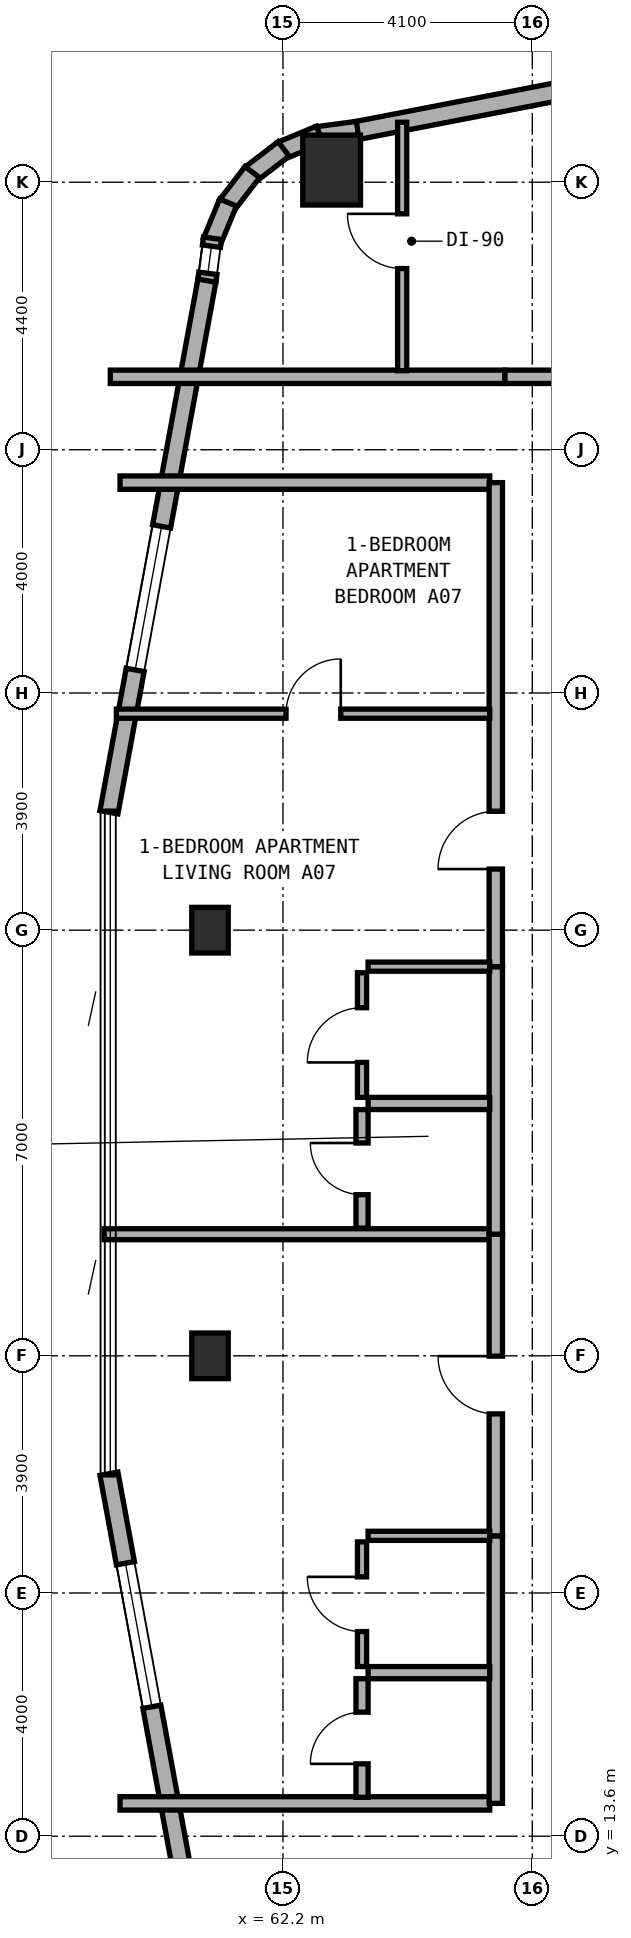
"""IFC4 building model, lengths in metres.
Left out: names, types, materials, properties, quantities, classifications, styles, units other than length and angle.
Written with IfcOpenShell. Run it as: python <this file> out.ifc"""

import sys

from ifc_helpers import new_model, si_unit, direction, frame, frame_2d, origin, origin_2d, place, context, subcontext, project, spatial, rectangle, extrude, element, fill, save


model = new_model("IFC4")
c1 = context("Model", 3, precision=1e-05, world=origin(), true_north=direction((0.0, 1.0)))
c2 = subcontext(c1, "Body", "Model", "MODEL_VIEW")
j1 = project(units=[si_unit("LENGTHUNIT", "METRE"), si_unit("PLANEANGLEUNIT", "RADIAN")], contexts=[c1])
p1 = place(None, origin())
s1 = spatial("IfcSite", under=j1, at=p1, CompositionType="ELEMENT")
p2 = place(p1, origin())
s2 = spatial("IfcBuilding", under=s1, at=p2, CompositionType="ELEMENT")
p3 = place(p2, frame((0.0, 0.0, 80.0)))
s3 = spatial("IfcBuildingStorey", under=s2, at=p3, CompositionType="ELEMENT", Elevation=80.0)
for number, where, z_axis, x_axis in (
    (1, (61.0, 21.5, 0.0), (0.0, 0.0, 1.0), (1.0, 0.0, 0.0)),
    (2, (61.0, 28.5, 0.0), (0.0, 0.0, 1.0), (1.0, 0.0, 0.0)),
):
    element("IfcColumn", number, at=place(p3, frame(where, z_axis=z_axis, x_axis=x_axis)), inside=s3, PredefinedType="COLUMN", context=c2, shape_type="SweptSolid", body=[
        extrude(rectangle(XDim=0.6, YDim=0.75, at=origin_2d()), origin(), (0.0, 0.0, 1.0), 3.5),
    ])
p4 = place(p3, frame((63.0, 41.0, 0.0), z_axis=(0.0, 0.0, 1.0), x_axis=(1.0, 0.0, 0.0)))
e3 = element("IfcColumn", 3, at=p4, inside=s3, PredefinedType="COLUMN", context=c2, shape_type="SweptSolid", body=[
    extrude(rectangle(XDim=0.95, YDim=1.15, at=origin_2d()), origin(), (0.0, 0.0, 1.0), 3.5),
])
p5 = place(p3, frame((71.743, 43.263, 0.0), z_axis=(0.0, 0.0, 1.0), x_axis=(-0.981750199588, -0.190175039396, 0.0)))
e4 = element("IfcWall", 4, at=p5, inside=s3, PredefinedType="STANDARD", context=c2, shape_type="SweptSolid", body=[
    extrude(rectangle(XDim=8.477, YDim=0.3, at=frame_2d((4.238, 0.0))), origin(), (0.0, 0.0, 1.0), 3.25),
])
p6 = place(p5, frame((2.623, 0.0, 0.8)))
e5 = element("IfcOpeningElement", 5, at=p6, cuts=e4, PredefinedType="OPENING", context=c2, shape_type="SweptSolid", body=[
    extrude(rectangle(XDim=2.4, YDim=1.6, at=frame_2d((1.2, 0.8))), frame((0.0, 0.16, 0.0), z_axis=(0.0, -1.0, 0.0), x_axis=(1.0, 0.0, 0.0)), (0.0, 0.0, 1.0), 0.32),
])
p7 = place(p3, frame((63.428, 41.652, 0.0), z_axis=(0.0, 0.0, 1.0), x_axis=(-0.991293937098, -0.131667498923, 0.0)))
e6 = element("IfcWall", 6, at=p7, inside=s3, PredefinedType="STANDARD", context=c2, shape_type="SweptSolid", body=[
    extrude(rectangle(XDim=0.677, YDim=0.3, at=frame_2d((0.338, 0.0))), origin(), (0.0, 0.0, 1.0), 3.25),
])
p8 = place(p3, frame((62.807, 41.582, 0.0), z_axis=(0.0, 0.0, 1.0), x_axis=(-0.924042561464, -0.382289608286, 0.0)))
e7 = element("IfcWall", 7, at=p8, inside=s3, PredefinedType="STANDARD", context=c2, shape_type="SweptSolid", body=[
    extrude(rectangle(XDim=0.694, YDim=0.3, at=frame_2d((0.347, 0.0))), origin(), (0.0, 0.0, 1.0), 3.25),
])
for number, where, z_axis, x_axis in (
    (8, (62.211, 41.348, 0.0), (0.0, 0.0, 1.0), (-0.793, -0.609, 0.0)),
    (9, (61.696, 40.967, 0.0), (0.0, 0.0, 1.0), (-0.61, -0.793, 0.0)),
    (10, (61.297, 40.466, 0.0), (0.0, 0.0, 1.0), (-0.382, -0.924, 0.0)),
):
    element("IfcWall", number, at=place(p3, frame(where, z_axis=z_axis, x_axis=x_axis)), inside=s3, PredefinedType="STANDARD", context=c2, shape_type="SweptSolid", body=[
        extrude(rectangle(XDim=0.694, YDim=0.3, at=frame_2d((0.347, 0.0))), origin(), (0.0, 0.0, 1.0), 3.25),
    ])
p9 = place(p3, frame((61.041, 39.878, 0.0), z_axis=(0.0, 0.0, 1.0), x_axis=(-0.130658543777, -0.991427427974, 0.0)))
e11 = element("IfcWall", 11, at=p9, inside=s3, PredefinedType="STANDARD", context=c2, shape_type="SweptSolid", body=[
    extrude(rectangle(XDim=0.712, YDim=0.3, at=frame_2d((0.356, 0.0))), origin(), (0.0, 0.0, 1.0), 3.25),
])
p10 = place(p9, frame((0.131, 0.0, 0.85)))
e12 = element("IfcOpeningElement", 12, at=p10, cuts=e11, PredefinedType="OPENING", context=c2, shape_type="SweptSolid", body=[
    extrude(rectangle(XDim=0.45, YDim=1.5, at=frame_2d((0.225, 0.75))), frame((0.0, 0.16, 0.0), z_axis=(0.0, -1.0, 0.0), x_axis=(1.0, 0.0, 0.0)), (0.0, 0.0, 1.0), 0.32),
])
p11 = place(p3, frame((60.949, 39.181, 0.0), z_axis=(0.0, 0.0, 1.0), x_axis=(-0.181241420611, -0.983438634311, 0.0)))
e13 = element("IfcWall", 13, at=p11, inside=s3, PredefinedType="STANDARD", context=c2, shape_type="SweptSolid", body=[
    extrude(rectangle(XDim=8.889, YDim=0.3, at=frame_2d((4.445, 0.0))), origin(), (0.0, 0.0, 1.0), 3.25),
])
p12 = place(p11, frame((4.109, 0.0, 0.8)))
e14 = element("IfcOpeningElement", 14, at=p12, cuts=e13, PredefinedType="OPENING", context=c2, shape_type="SweptSolid", body=[
    extrude(rectangle(XDim=2.4, YDim=1.6, at=frame_2d((1.2, 0.8))), frame((0.0, 0.16, 0.0), z_axis=(0.0, -1.0, 0.0), x_axis=(1.0, 0.0, 0.0)), (0.0, 0.0, 1.0), 0.32),
])
p13 = place(p3, frame((59.338, 19.561, 0.0), z_axis=(0.0, 0.0, 1.0), x_axis=(0.181241420611, -0.983438634311, 0.0)))
e15 = element("IfcWall", 15, at=p13, inside=s3, PredefinedType="STANDARD", context=c2, shape_type="SweptSolid", body=[
    extrude(rectangle(XDim=8.889, YDim=0.3, at=frame_2d((4.445, 0.0))), origin(), (0.0, 0.0, 1.0), 3.25),
])
p14 = place(p13, frame((1.497, 0.0, 0.8)))
e16 = element("IfcOpeningElement", 16, at=p14, cuts=e15, PredefinedType="OPENING", context=c2, shape_type="SweptSolid", body=[
    extrude(rectangle(XDim=2.4, YDim=1.6, at=frame_2d((1.2, 0.8))), frame((0.0, 0.16, 0.0), z_axis=(0.0, -1.0, 0.0), x_axis=(1.0, 0.0, 0.0)), (0.0, 0.0, 1.0), 0.32),
])
p15 = place(p3, frame((59.36, 37.6, 0.0), z_axis=(0.0, 0.0, 1.0), x_axis=(1.0, 0.0, 0.0)))
e17 = element("IfcWall", 17, at=p15, inside=s3, PredefinedType="SOLIDWALL", context=c2, shape_type="SweptSolid", body=[
    extrude(rectangle(XDim=6.49, YDim=0.22, at=frame_2d((3.245, 0.0))), origin(), (0.0, 0.0, 1.0), 2.945),
])
p16 = place(p3, frame((65.85, 37.6, 0.0), z_axis=(0.0, 0.0, 1.0), x_axis=(1.0, 0.0, 0.0)))
e18 = element("IfcWall", 18, at=p16, inside=s3, PredefinedType="SOLIDWALL", context=c2, shape_type="SweptSolid", body=[
    extrude(rectangle(XDim=4.57, YDim=0.22, at=frame_2d((2.285, 0.0))), origin(), (0.0, 0.0, 1.0), 3.22),
])
p17 = place(p16, frame((1.81, 0.0, 0.0)))
e19 = element("IfcOpeningElement", 19, at=p17, cuts=e18, PredefinedType="OPENING", context=c2, shape_type="SweptSolid", body=[
    extrude(rectangle(XDim=0.95, YDim=2.1, at=frame_2d((0.475, 1.05))), frame((0.0, 0.12, 0.0), z_axis=(0.0, -1.0, 0.0), x_axis=(1.0, 0.0, 0.0)), (0.0, 0.0, 1.0), 0.24),
])
p18 = place(p3, frame((64.16, 37.7, 0.0), z_axis=(0.0, 0.0, 1.0), x_axis=(0.0, 1.0, 0.0)))
e20 = element("IfcWall", 20, at=p18, inside=s3, PredefinedType="PARTITIONING", context=c2, shape_type="SweptSolid", body=[
    extrude(rectangle(XDim=4.086, YDim=0.15, at=frame_2d((2.043, 0.0))), origin(), (0.0, 0.0, 1.0), 2.945),
])
p19 = place(p18, frame((1.68, 0.0, 0.0)))
e21 = element("IfcOpeningElement", 21, at=p19, cuts=e20, PredefinedType="OPENING", context=c2, shape_type="SweptSolid", body=[
    extrude(rectangle(XDim=0.9, YDim=2.1, at=frame_2d((0.45, 1.05))), frame((0.0, 0.085, 0.0), z_axis=(0.0, -1.0, 0.0), x_axis=(1.0, 0.0, 0.0)), (0.0, 0.0, 1.0), 0.17),
])
for number, where, z_axis, x_axis in (
    (22, (59.52, 14.14, 0.0), (0.0, 0.0, 1.0), (1.0, 0.0, 0.0)),
    (23, (59.52, 35.86, 0.0), (0.0, 0.0, 1.0), (1.0, 0.0, 0.0)),
):
    element("IfcWall", number, at=place(p3, frame(where, z_axis=z_axis, x_axis=x_axis)), inside=s3, PredefinedType="SOLIDWALL", context=c2, shape_type="SweptSolid", body=[
        extrude(rectangle(XDim=6.08, YDim=0.22, at=frame_2d((3.04, 0.0))), origin(), (0.0, 0.0, 1.0), 2.945),
    ])
p20 = place(p3, frame((59.26, 23.5, 0.0), z_axis=(0.0, 0.0, 1.0), x_axis=(1.0, 0.0, 0.0)))
e24 = element("IfcWall", 24, at=p20, inside=s3, PredefinedType="SOLIDWALL", context=c2, shape_type="SweptSolid", body=[
    extrude(rectangle(XDim=6.44, YDim=0.18, at=frame_2d((3.22, 0.0))), origin(), (0.0, 0.0, 1.0), 2.945),
])
p21 = place(p3, frame((65.7, 14.14, 0.0), z_axis=(0.0, 0.0, 1.0), x_axis=(0.0, 1.0, 0.0)))
e25 = element("IfcWall", 25, at=p21, inside=s3, PredefinedType="SOLIDWALL", context=c2, shape_type="SweptSolid", body=[
    extrude(rectangle(XDim=4.4, YDim=0.22, at=frame_2d((2.2, 0.0))), origin(), (0.0, 0.0, 1.0), 3.22),
])
p22 = place(p3, frame((65.7, 18.54, 0.0), z_axis=(0.0, 0.0, 1.0), x_axis=(0.0, 1.0, 0.0)))
e26 = element("IfcWall", 26, at=p22, inside=s3, PredefinedType="SOLIDWALL", context=c2, shape_type="SweptSolid", body=[
    extrude(rectangle(XDim=4.96, YDim=0.22, at=frame_2d((2.48, 0.0))), origin(), (0.0, 0.0, 1.0), 2.825),
])
p23 = place(p22, frame((2.005, 0.0, 0.0)))
e27 = element("IfcOpeningElement", 27, at=p23, cuts=e26, PredefinedType="OPENING", context=c2, shape_type="SweptSolid", body=[
    extrude(rectangle(XDim=0.95, YDim=2.1, at=frame_2d((0.475, 1.05))), frame((0.0, 0.12, 0.0), z_axis=(0.0, -1.0, 0.0), x_axis=(1.0, 0.0, 0.0)), (0.0, 0.0, 1.0), 0.24),
])
p24 = place(p3, frame((63.6, 16.29, 0.0), z_axis=(0.0, 0.0, 1.0), x_axis=(1.0, 0.0, 0.0)))
e28 = element("IfcWall", 28, at=p24, inside=s3, PredefinedType="PLUMBINGWALL", context=c2, shape_type="SweptSolid", body=[
    extrude(rectangle(XDim=2.0, YDim=0.2, at=frame_2d((1.0, 0.0))), origin(), (0.0, 0.0, 1.0), 3.22),
])
p25 = place(p3, frame((63.6, 18.54, 0.0), z_axis=(0.0, 0.0, 1.0), x_axis=(1.0, 0.0, 0.0)))
e29 = element("IfcWall", 29, at=p25, inside=s3, PredefinedType="PARTITIONING", context=c2, shape_type="SweptSolid", body=[
    extrude(rectangle(XDim=2.0, YDim=0.15, at=frame_2d((1.0, 0.0))), origin(), (0.0, 0.0, 1.0), 3.22),
])
p26 = place(p3, frame((63.5, 14.24, 0.0), z_axis=(0.0, 0.0, 1.0), x_axis=(0.0, 1.0, 0.0)))
e30 = element("IfcWall", 30, at=p26, inside=s3, PredefinedType="PLUMBINGWALL", context=c2, shape_type="SweptSolid", body=[
    extrude(rectangle(XDim=1.95, YDim=0.2, at=frame_2d((0.975, 0.0))), origin(), (0.0, 0.0, 1.0), 3.22),
])
p27 = place(p26, frame((0.55, 0.0, 0.0)))
e31 = element("IfcOpeningElement", 31, at=p27, cuts=e30, PredefinedType="OPENING", context=c2, shape_type="SweptSolid", body=[
    extrude(rectangle(XDim=0.85, YDim=2.1, at=frame_2d((0.425, 1.05))), frame((0.0, 0.11, 0.0), z_axis=(0.0, -1.0, 0.0), x_axis=(1.0, 0.0, 0.0)), (0.0, 0.0, 1.0), 0.22),
])
p28 = place(p3, frame((63.5, 16.39, 0.0), z_axis=(0.0, 0.0, 1.0), x_axis=(0.0, 1.0, 0.0)))
e32 = element("IfcWall", 32, at=p28, inside=s3, PredefinedType="PARTITIONING", context=c2, shape_type="SweptSolid", body=[
    extrude(rectangle(XDim=2.05, YDim=0.15, at=frame_2d((1.025, 0.0))), origin(), (0.0, 0.0, 1.0), 3.22),
])
p29 = place(p28, frame((0.575, 0.0, 0.0)))
e33 = element("IfcOpeningElement", 33, at=p29, cuts=e32, PredefinedType="OPENING", context=c2, shape_type="SweptSolid", body=[
    extrude(rectangle(XDim=0.9, YDim=2.1, at=frame_2d((0.45, 1.05))), frame((0.0, 0.085, 0.0), z_axis=(0.0, -1.0, 0.0), x_axis=(1.0, 0.0, 0.0)), (0.0, 0.0, 1.0), 0.17),
])
p30 = place(p3, frame((65.7, 23.5, 0.0), z_axis=(0.0, 0.0, 1.0), x_axis=(0.0, 1.0, 0.0)))
e34 = element("IfcWall", 34, at=p30, inside=s3, PredefinedType="SOLIDWALL", context=c2, shape_type="SweptSolid", body=[
    extrude(rectangle(XDim=4.4, YDim=0.22, at=frame_2d((2.2, 0.0))), origin(), (0.0, 0.0, 1.0), 3.22),
])
p31 = place(p3, frame((65.7, 27.9, 0.0), z_axis=(0.0, 0.0, 1.0), x_axis=(0.0, 1.0, 0.0)))
e35 = element("IfcWall", 35, at=p31, inside=s3, PredefinedType="SOLIDWALL", context=c2, shape_type="SweptSolid", body=[
    extrude(rectangle(XDim=7.96, YDim=0.22, at=frame_2d((3.98, 0.0))), origin(), (0.0, 0.0, 1.0), 2.825),
])
p32 = place(p31, frame((1.605, 0.0, 0.0)))
e36 = element("IfcOpeningElement", 36, at=p32, cuts=e35, PredefinedType="OPENING", context=c2, shape_type="SweptSolid", body=[
    extrude(rectangle(XDim=0.95, YDim=2.1, at=frame_2d((0.475, 1.05))), frame((0.0, 0.12, 0.0), z_axis=(0.0, -1.0, 0.0), x_axis=(1.0, 0.0, 0.0)), (0.0, 0.0, 1.0), 0.24),
])
p33 = place(p3, frame((59.46, 32.06, 0.0), z_axis=(0.0, 0.0, 1.0), x_axis=(1.0, 0.0, 0.0)))
e37 = element("IfcWall", 37, at=p33, inside=s3, PredefinedType="PARTITIONING", context=c2, shape_type="SweptSolid", body=[
    extrude(rectangle(XDim=6.14, YDim=0.15, at=frame_2d((3.07, 0.0))), origin(), (0.0, 0.0, 1.0), 2.945),
])
p34 = place(p33, frame((2.79, 0.0, 0.0)))
e38 = element("IfcOpeningElement", 38, at=p34, cuts=e37, PredefinedType="OPENING", context=c2, shape_type="SweptSolid", body=[
    extrude(rectangle(XDim=0.9, YDim=2.1, at=frame_2d((0.45, 1.05))), frame((0.0, 0.085, 0.0), z_axis=(0.0, -1.0, 0.0), x_axis=(1.0, 0.0, 0.0)), (0.0, 0.0, 1.0), 0.17),
])
p35 = place(p3, frame((63.6, 25.65, 0.0), z_axis=(0.0, 0.0, 1.0), x_axis=(1.0, 0.0, 0.0)))
e39 = element("IfcWall", 39, at=p35, inside=s3, PredefinedType="PLUMBINGWALL", context=c2, shape_type="SweptSolid", body=[
    extrude(rectangle(XDim=2.0, YDim=0.2, at=frame_2d((1.0, 0.0))), origin(), (0.0, 0.0, 1.0), 3.22),
])
p36 = place(p3, frame((63.6, 27.9, 0.0), z_axis=(0.0, 0.0, 1.0), x_axis=(1.0, 0.0, 0.0)))
e40 = element("IfcWall", 40, at=p36, inside=s3, PredefinedType="PARTITIONING", context=c2, shape_type="SweptSolid", body=[
    extrude(rectangle(XDim=2.0, YDim=0.15, at=frame_2d((1.0, 0.0))), origin(), (0.0, 0.0, 1.0), 3.22),
])
p37 = place(p3, frame((63.5, 23.6, 0.0), z_axis=(0.0, 0.0, 1.0), x_axis=(0.0, 1.0, 0.0)))
e41 = element("IfcWall", 41, at=p37, inside=s3, PredefinedType="PLUMBINGWALL", context=c2, shape_type="SweptSolid", body=[
    extrude(rectangle(XDim=1.95, YDim=0.2, at=frame_2d((0.975, 0.0))), origin(), (0.0, 0.0, 1.0), 3.22),
])
p38 = place(p37, frame((0.55, 0.0, 0.0)))
e42 = element("IfcOpeningElement", 42, at=p38, cuts=e41, PredefinedType="OPENING", context=c2, shape_type="SweptSolid", body=[
    extrude(rectangle(XDim=0.85, YDim=2.1, at=frame_2d((0.425, 1.05))), frame((0.0, 0.11, 0.0), z_axis=(0.0, -1.0, 0.0), x_axis=(1.0, 0.0, 0.0)), (0.0, 0.0, 1.0), 0.22),
])
p39 = place(p3, frame((63.5, 25.75, 0.0), z_axis=(0.0, 0.0, 1.0), x_axis=(0.0, 1.0, 0.0)))
e43 = element("IfcWall", 43, at=p39, inside=s3, PredefinedType="PARTITIONING", context=c2, shape_type="SweptSolid", body=[
    extrude(rectangle(XDim=2.05, YDim=0.15, at=frame_2d((1.025, 0.0))), origin(), (0.0, 0.0, 1.0), 3.22),
])
p40 = place(p39, frame((0.575, 0.0, 0.0)))
e44 = element("IfcOpeningElement", 44, at=p40, cuts=e43, PredefinedType="OPENING", context=c2, shape_type="SweptSolid", body=[
    extrude(rectangle(XDim=0.9, YDim=2.1, at=frame_2d((0.45, 1.05))), frame((0.0, 0.085, 0.0), z_axis=(0.0, -1.0, 0.0), x_axis=(1.0, 0.0, 0.0)), (0.0, 0.0, 1.0), 0.17),
])
p41 = place(p12, origin())
e45 = element("IfcWindow", 45, at=p41, inside=s3, PartitioningType="SINGLE_PANEL", PredefinedType="WINDOW", context=c2, shape_type="SweptSolid", body=[
    extrude(rectangle(XDim=2.4, YDim=1.6, at=frame_2d((1.2, 0.8))), frame((0.0, 0.03, 0.0), z_axis=(0.0, -1.0, 0.0), x_axis=(1.0, 0.0, 0.0)), (0.0, 0.0, 1.0), 0.06),
])
fill(e14, e45)
p42 = place(p14, origin())
e46 = element("IfcWindow", 46, at=p42, inside=s3, PartitioningType="SINGLE_PANEL", PredefinedType="WINDOW", context=c2, shape_type="SweptSolid", body=[
    extrude(rectangle(XDim=2.4, YDim=1.6, at=frame_2d((1.2, 0.8))), frame((0.0, 0.03, 0.0), z_axis=(0.0, -1.0, 0.0), x_axis=(1.0, 0.0, 0.0)), (0.0, 0.0, 1.0), 0.06),
])
fill(e16, e46)
p43 = place(p10, origin())
e47 = element("IfcWindow", 47, at=p43, inside=s3, PartitioningType="SINGLE_PANEL", PredefinedType="WINDOW", context=c2, shape_type="SweptSolid", body=[
    extrude(rectangle(XDim=0.45, YDim=1.5, at=frame_2d((0.225, 0.75))), frame((0.0, 0.03, 0.0), z_axis=(0.0, -1.0, 0.0), x_axis=(1.0, 0.0, 0.0)), (0.0, 0.0, 1.0), 0.06),
])
fill(e12, e47)
p44 = place(p19, origin())
e48 = element("IfcDoor", 48, at=p44, inside=s3, OperationType="SINGLE_SWING_RIGHT", PredefinedType="DOOR", context=c2, shape_type="SweptSolid", body=[
    extrude(rectangle(XDim=0.9, YDim=2.1, at=frame_2d((0.45, 1.05))), frame((0.0, 0.025, 0.0), z_axis=(0.0, -1.0, 0.0), x_axis=(1.0, 0.0, 0.0)), (0.0, 0.0, 1.0), 0.05),
])
fill(e21, e48)
p45 = place(p23, origin())
e49 = element("IfcDoor", 49, at=p45, inside=s3, OperationType="SINGLE_SWING_RIGHT", PredefinedType="DOOR", context=c2, shape_type="SweptSolid", body=[
    extrude(rectangle(XDim=0.95, YDim=2.1, at=frame_2d((0.475, 1.05))), frame((0.0, 0.025, 0.0), z_axis=(0.0, -1.0, 0.0), x_axis=(1.0, 0.0, 0.0)), (0.0, 0.0, 1.0), 0.05),
])
fill(e27, e49)
p46 = place(p27, origin())
e50 = element("IfcDoor", 50, at=p46, inside=s3, OperationType="SINGLE_SWING_LEFT", PredefinedType="DOOR", context=c2, shape_type="SweptSolid", body=[
    extrude(rectangle(XDim=0.85, YDim=2.1, at=frame_2d((0.425, 1.05))), frame((0.0, 0.025, 0.0), z_axis=(0.0, -1.0, 0.0), x_axis=(1.0, 0.0, 0.0)), (0.0, 0.0, 1.0), 0.05),
])
fill(e31, e50)
p47 = place(p29, origin())
e51 = element("IfcDoor", 51, at=p47, inside=s3, OperationType="SINGLE_SWING_RIGHT", PredefinedType="DOOR", context=c2, shape_type="SweptSolid", body=[
    extrude(rectangle(XDim=0.9, YDim=2.1, at=frame_2d((0.45, 1.05))), frame((0.0, 0.025, 0.0), z_axis=(0.0, -1.0, 0.0), x_axis=(1.0, 0.0, 0.0)), (0.0, 0.0, 1.0), 0.05),
])
fill(e33, e51)
p48 = place(p32, origin())
e52 = element("IfcDoor", 52, at=p48, inside=s3, OperationType="SINGLE_SWING_LEFT", PredefinedType="DOOR", context=c2, shape_type="SweptSolid", body=[
    extrude(rectangle(XDim=0.95, YDim=2.1, at=frame_2d((0.475, 1.05))), frame((0.0, 0.025, 0.0), z_axis=(0.0, -1.0, 0.0), x_axis=(1.0, 0.0, 0.0)), (0.0, 0.0, 1.0), 0.05),
])
fill(e36, e52)
p49 = place(p34, origin())
e53 = element("IfcDoor", 53, at=p49, inside=s3, OperationType="SINGLE_SWING_RIGHT", PredefinedType="DOOR", context=c2, shape_type="SweptSolid", body=[
    extrude(rectangle(XDim=0.9, YDim=2.1, at=frame_2d((0.45, 1.05))), frame((0.0, 0.025, 0.0), z_axis=(0.0, -1.0, 0.0), x_axis=(1.0, 0.0, 0.0)), (0.0, 0.0, 1.0), 0.05),
])
fill(e38, e53)
p50 = place(p38, origin())
e54 = element("IfcDoor", 54, at=p50, inside=s3, OperationType="SINGLE_SWING_RIGHT", PredefinedType="DOOR", context=c2, shape_type="SweptSolid", body=[
    extrude(rectangle(XDim=0.85, YDim=2.1, at=frame_2d((0.425, 1.05))), frame((0.0, 0.025, 0.0), z_axis=(0.0, -1.0, 0.0), x_axis=(1.0, 0.0, 0.0)), (0.0, 0.0, 1.0), 0.05),
])
fill(e42, e54)
p51 = place(p40, origin())
e55 = element("IfcDoor", 55, at=p51, inside=s3, OperationType="SINGLE_SWING_LEFT", PredefinedType="DOOR", context=c2, shape_type="SweptSolid", body=[
    extrude(rectangle(XDim=0.9, YDim=2.1, at=frame_2d((0.45, 1.05))), frame((0.0, 0.025, 0.0), z_axis=(0.0, -1.0, 0.0), x_axis=(1.0, 0.0, 0.0)), (0.0, 0.0, 1.0), 0.05),
])
fill(e44, e55)
save(model, sys.argv[1])
